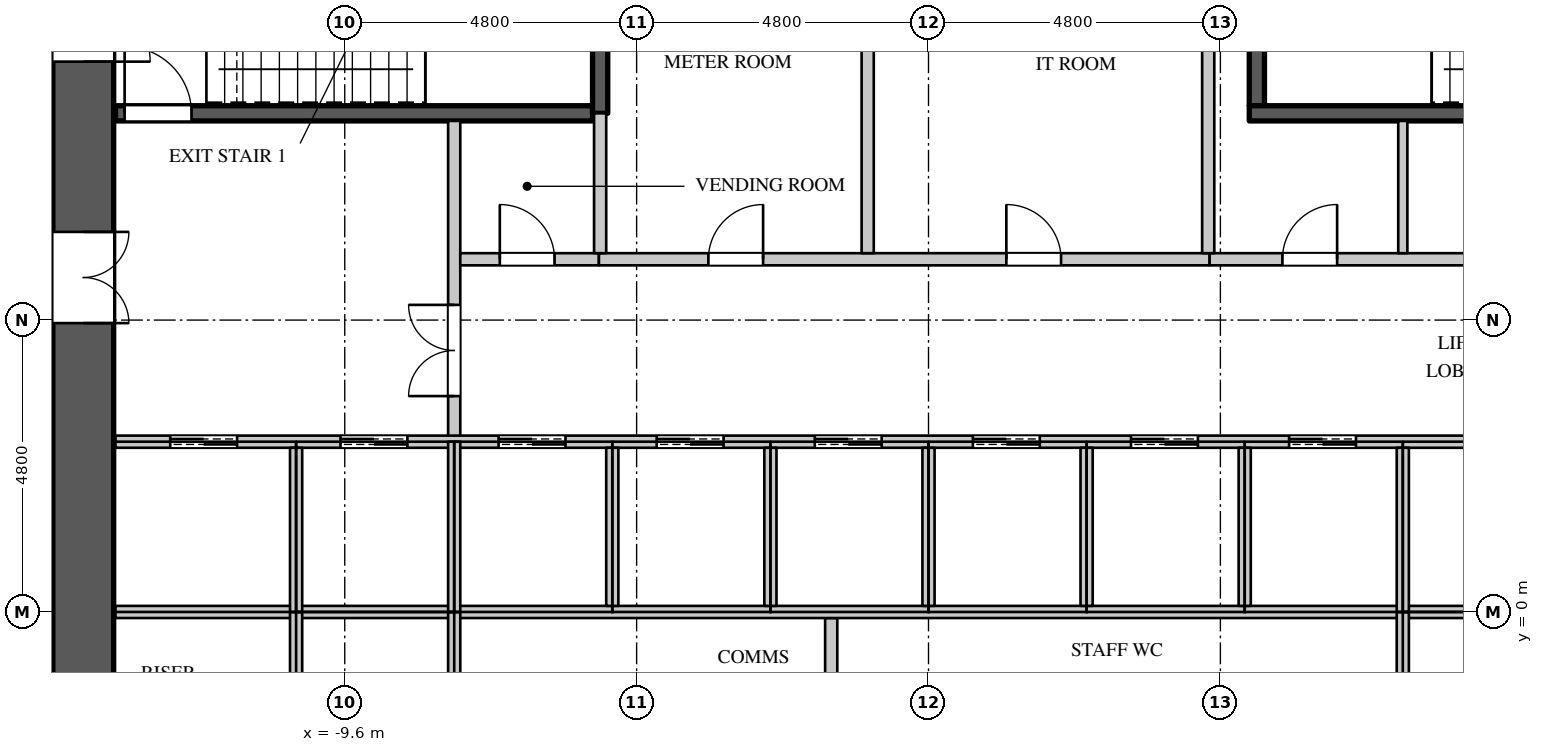
"""IFC4 building model, lengths in metres.
Left out: names, types, materials, properties, quantities, classifications, styles, units other than length and angle.
Written with IfcOpenShell. Run it as: python <this file> out.ifc"""

import sys

from ifc_helpers import new_model, si_unit, direction, frame, frame_2d, origin, place, context, subcontext, project, spatial, rectangle, extrude, element, fill, save


model = new_model("IFC4")
c1 = context("Model", 3, precision=1e-05, world=origin(), true_north=direction((0.0, 1.0)))
c2 = subcontext(c1, "Body", "Model", "MODEL_VIEW")
j1 = project(units=[si_unit("LENGTHUNIT", "METRE"), si_unit("PLANEANGLEUNIT", "RADIAN")], contexts=[c1])
p1 = place(None, origin())
s1 = spatial("IfcSite", under=j1, at=p1, CompositionType="ELEMENT")
p2 = place(p1, origin())
s2 = spatial("IfcBuilding", under=s1, at=p2, CompositionType="ELEMENT")
p3 = place(p2, frame((0.0, 0.0, 80.1)))
s3 = spatial("IfcBuildingStorey", under=s2, at=p3, CompositionType="ELEMENT", Elevation=80.1)
p4 = place(p3, frame((-13.9, -11.0, 0.0), z_axis=(0.0, 0.0, 1.0), x_axis=(0.0, 1.0, 0.0)))
e1 = element("IfcWall", 1, at=p4, inside=s3, PredefinedType="SHEAR", context=c2, shape_type="SweptSolid", body=[
    extrude(rectangle(XDim=22.0, YDim=1.0, at=frame_2d((11.0, 0.0))), origin(), (0.0, 0.0, 1.0), 4.2),
])
p5 = place(p4, frame((20.05, 0.0, 0.0)))
e2 = element("IfcOpeningElement", 2, at=p5, cuts=e1, PredefinedType="OPENING", context=c2, shape_type="SweptSolid", body=[
    extrude(rectangle(XDim=1.1, YDim=2.2, at=frame_2d((0.55, 1.1))), frame((0.0, 0.51, 0.0), z_axis=(0.0, -1.0, 0.0), x_axis=(1.0, 0.0, 0.0)), (0.0, 0.0, 1.0), 1.02),
])
p6 = place(p4, frame((0.85, 0.0, 0.0)))
e3 = element("IfcOpeningElement", 3, at=p6, cuts=e1, PredefinedType="OPENING", context=c2, shape_type="SweptSolid", body=[
    extrude(rectangle(XDim=1.1, YDim=2.2, at=frame_2d((0.55, 1.1))), frame((0.0, 0.51, 0.0), z_axis=(0.0, -1.0, 0.0), x_axis=(1.0, 0.0, 0.0)), (0.0, 0.0, 1.0), 1.02),
])
p7 = place(p4, frame((15.75, 0.0, 0.0)))
e4 = element("IfcOpeningElement", 4, at=p7, cuts=e1, PredefinedType="OPENING", context=c2, shape_type="SweptSolid", body=[
    extrude(rectangle(XDim=1.5, YDim=2.4, at=frame_2d((0.75, 1.2))), frame((0.0, 0.51, 0.0), z_axis=(0.0, -1.0, 0.0), x_axis=(1.0, 0.0, 0.0)), (0.0, 0.0, 1.0), 1.02),
])
p8 = place(p4, frame((4.75, 0.0, 0.0)))
e5 = element("IfcOpeningElement", 5, at=p8, cuts=e1, PredefinedType="OPENING", context=c2, shape_type="SweptSolid", body=[
    extrude(rectangle(XDim=1.5, YDim=2.4, at=frame_2d((0.75, 1.2))), frame((0.0, 0.51, 0.0), z_axis=(0.0, -1.0, 0.0), x_axis=(1.0, 0.0, 0.0)), (0.0, 0.0, 1.0), 1.02),
])
p9 = place(p3, frame((-7.8, 2.8, 0.0), z_axis=(0.0, 0.0, 1.0), x_axis=(0.0, 1.0, 0.0)))
e6 = element("IfcWall", 6, at=p9, inside=s3, PredefinedType="PARTITIONING", context=c2, shape_type="SweptSolid", body=[
    extrude(rectangle(XDim=5.275, YDim=0.2, at=frame_2d((2.637, 0.0))), origin(), (0.0, 0.0, 1.0), 3.95),
])
p10 = place(p9, frame((0.75, 0.0, 0.0)))
e7 = element("IfcOpeningElement", 7, at=p10, cuts=e6, PredefinedType="OPENING", context=c2, shape_type="SweptSolid", body=[
    extrude(rectangle(XDim=1.5, YDim=2.4, at=frame_2d((0.75, 1.2))), frame((0.0, 0.11, 0.0), z_axis=(0.0, -1.0, 0.0), x_axis=(1.0, 0.0, 0.0)), (0.0, 0.0, 1.0), 0.22),
])
p11 = place(p3, frame((-7.7, 5.8, 0.0), z_axis=(0.0, 0.0, 1.0), x_axis=(1.0, 0.0, 0.0)))
e8 = element("IfcWall", 8, at=p11, inside=s3, PredefinedType="PARTITIONING", context=c2, shape_type="SweptSolid", body=[
    extrude(rectangle(XDim=2.28, YDim=0.2, at=frame_2d((1.14, 0.0))), origin(), (0.0, 0.0, 1.0), 3.95),
])
p12 = place(p11, frame((0.65, 0.0, 0.0)))
e9 = element("IfcOpeningElement", 9, at=p12, cuts=e8, PredefinedType="OPENING", context=c2, shape_type="SweptSolid", body=[
    extrude(rectangle(XDim=0.9, YDim=2.2, at=frame_2d((0.45, 1.1))), frame((0.0, 0.11, 0.0), z_axis=(0.0, -1.0, 0.0), x_axis=(1.0, 0.0, 0.0)), (0.0, 0.0, 1.0), 0.22),
])
p13 = place(p3, frame((4.62, 5.8, 0.0), z_axis=(0.0, 0.0, 1.0), x_axis=(1.0, 0.0, 0.0)))
e10 = element("IfcWall", 10, at=p13, inside=s3, PredefinedType="PARTITIONING", context=c2, shape_type="SweptSolid", body=[
    extrude(rectangle(XDim=8.75, YDim=0.2, at=frame_2d((4.375, 0.0))), origin(), (0.0, 0.0, 1.0), 3.95),
])
p14 = place(p13, frame((1.2, 0.0, 0.0)))
e11 = element("IfcOpeningElement", 11, at=p14, cuts=e10, PredefinedType="OPENING", context=c2, shape_type="SweptSolid", body=[
    extrude(rectangle(XDim=0.9, YDim=2.2, at=frame_2d((0.45, 1.1))), frame((0.0, 0.11, 0.0), z_axis=(0.0, -1.0, 0.0), x_axis=(1.0, 0.0, 0.0)), (0.0, 0.0, 1.0), 0.22),
])
p15 = place(p13, frame((5.45, 0.0, 0.0)))
e12 = element("IfcOpeningElement", 12, at=p15, cuts=e10, PredefinedType="OPENING", context=c2, shape_type="SweptSolid", body=[
    extrude(rectangle(XDim=0.9, YDim=2.2, at=frame_2d((0.45, 1.1))), frame((0.0, 0.11, 0.0), z_axis=(0.0, -1.0, 0.0), x_axis=(1.0, 0.0, 0.0)), (0.0, 0.0, 1.0), 0.22),
])
p16 = place(p3, frame((7.8, 5.9, 0.0), z_axis=(0.0, 0.0, 1.0), x_axis=(0.0, 1.0, 0.0)))
e13 = element("IfcWall", 13, at=p16, inside=s3, PredefinedType="PARTITIONING", context=c2, shape_type="SweptSolid", body=[
    extrude(rectangle(XDim=2.175, YDim=0.15, at=frame_2d((1.087, 0.0))), origin(), (0.0, 0.0, 1.0), 3.95),
])
p17 = place(p3, frame((-5.42, 5.8, 0.0), z_axis=(0.0, 0.0, 1.0), x_axis=(1.0, 0.0, 0.0)))
e14 = element("IfcWall", 14, at=p17, inside=s3, PredefinedType="PARTITIONING", context=c2, shape_type="SweptSolid", body=[
    extrude(rectangle(XDim=10.04, YDim=0.2, at=frame_2d((5.02, 0.0))), origin(), (0.0, 0.0, 1.0), 3.95),
])
p18 = place(p17, frame((1.8, 0.0, 0.0)))
e15 = element("IfcOpeningElement", 15, at=p18, cuts=e14, PredefinedType="OPENING", context=c2, shape_type="SweptSolid", body=[
    extrude(rectangle(XDim=0.9, YDim=2.2, at=frame_2d((0.45, 1.1))), frame((0.0, 0.11, 0.0), z_axis=(0.0, -1.0, 0.0), x_axis=(1.0, 0.0, 0.0)), (0.0, 0.0, 1.0), 0.22),
])
p19 = place(p17, frame((6.7, 0.0, 0.0)))
e16 = element("IfcOpeningElement", 16, at=p19, cuts=e14, PredefinedType="OPENING", context=c2, shape_type="SweptSolid", body=[
    extrude(rectangle(XDim=0.9, YDim=2.2, at=frame_2d((0.45, 1.1))), frame((0.0, 0.11, 0.0), z_axis=(0.0, -1.0, 0.0), x_axis=(1.0, 0.0, 0.0)), (0.0, 0.0, 1.0), 0.22),
])
p20 = place(p3, frame((-5.4, 5.9, 0.0), z_axis=(0.0, 0.0, 1.0), x_axis=(0.0, 1.0, 0.0)))
e17 = element("IfcWall", 17, at=p20, inside=s3, PredefinedType="PARTITIONING", context=c2, shape_type="SweptSolid", body=[
    extrude(rectangle(XDim=2.3, YDim=0.2, at=frame_2d((1.15, 0.0))), origin(), (0.0, 0.0, 1.0), 3.95),
])
p21 = place(p3, frame((-1.6, -2.7, 0.0), z_axis=(0.0, 0.0, 1.0), x_axis=(0.0, 1.0, 0.0)))
e18 = element("IfcWall", 18, at=p21, inside=s3, PredefinedType="PARTITIONING", context=c2, shape_type="SweptSolid", body=[
    extrude(rectangle(XDim=2.6, YDim=0.2, at=frame_2d((1.3, 0.0))), origin(), (0.0, 0.0, 1.0), 3.95),
])
for number, where, z_axis, x_axis in (
    (19, (-1.0, 5.9, 0.0), (0.0, 0.0, 1.0), (0.0, 1.0, 0.0)),
    (20, (4.6, 5.9, 0.0), (0.0, 0.0, 1.0), (0.0, 1.0, 0.0)),
):
    element("IfcWall", number, at=place(p3, frame(where, z_axis=z_axis, x_axis=x_axis)), inside=s3, PredefinedType="PARTITIONING", context=c2, shape_type="SweptSolid", body=[
        extrude(rectangle(XDim=5.07, YDim=0.2, at=frame_2d((2.535, 0.0))), origin(), (0.0, 0.0, 1.0), 3.95),
    ])
p22 = place(p3, frame((-13.37, 0.0, 0.0), z_axis=(0.0, 0.0, 1.0), x_axis=(1.0, 0.0, 0.0)))
e21 = element("IfcWall", 21, at=p22, inside=s3, PredefinedType="PARTITIONING", context=c2, shape_type="SweptSolid", body=[
    extrude(rectangle(XDim=23.77, YDim=0.2, at=frame_2d((11.885, 0.0))), origin(), (0.0, 0.0, 1.0), 3.95),
])
p23 = place(p3, frame((-13.37, 2.8, 0.0), z_axis=(0.0, 0.0, 1.0), x_axis=(1.0, 0.0, 0.0)))
e22 = element("IfcWall", 22, at=p23, inside=s3, PredefinedType="PARTITIONING", context=c2, shape_type="SweptSolid", body=[
    extrude(rectangle(XDim=23.77, YDim=0.2, at=frame_2d((11.885, 0.0))), origin(), (0.0, 0.0, 1.0), 3.95),
])
p24 = place(p23, frame((0.9, 0.0, 0.0)))
e23 = element("IfcOpeningElement", 23, at=p24, cuts=e22, PredefinedType="OPENING", context=c2, shape_type="SweptSolid", body=[
    extrude(rectangle(XDim=1.1, YDim=2.2, at=frame_2d((0.55, 1.1))), frame((0.0, 0.11, 0.0), z_axis=(0.0, -1.0, 0.0), x_axis=(1.0, 0.0, 0.0)), (0.0, 0.0, 1.0), 0.22),
])
p25 = place(p23, frame((3.7, 0.0, 0.0)))
e24 = element("IfcOpeningElement", 24, at=p25, cuts=e22, PredefinedType="OPENING", context=c2, shape_type="SweptSolid", body=[
    extrude(rectangle(XDim=1.1, YDim=2.2, at=frame_2d((0.55, 1.1))), frame((0.0, 0.11, 0.0), z_axis=(0.0, -1.0, 0.0), x_axis=(1.0, 0.0, 0.0)), (0.0, 0.0, 1.0), 0.22),
])
p26 = place(p23, frame((6.3, 0.0, 0.0)))
e25 = element("IfcOpeningElement", 25, at=p26, cuts=e22, PredefinedType="OPENING", context=c2, shape_type="SweptSolid", body=[
    extrude(rectangle(XDim=1.1, YDim=2.2, at=frame_2d((0.55, 1.1))), frame((0.0, 0.11, 0.0), z_axis=(0.0, -1.0, 0.0), x_axis=(1.0, 0.0, 0.0)), (0.0, 0.0, 1.0), 0.22),
])
p27 = place(p23, frame((8.9, 0.0, 0.0)))
e26 = element("IfcOpeningElement", 26, at=p27, cuts=e22, PredefinedType="OPENING", context=c2, shape_type="SweptSolid", body=[
    extrude(rectangle(XDim=1.1, YDim=2.2, at=frame_2d((0.55, 1.1))), frame((0.0, 0.11, 0.0), z_axis=(0.0, -1.0, 0.0), x_axis=(1.0, 0.0, 0.0)), (0.0, 0.0, 1.0), 0.22),
])
p28 = place(p23, frame((11.5, 0.0, 0.0)))
e27 = element("IfcOpeningElement", 27, at=p28, cuts=e22, PredefinedType="OPENING", context=c2, shape_type="SweptSolid", body=[
    extrude(rectangle(XDim=1.1, YDim=2.2, at=frame_2d((0.55, 1.1))), frame((0.0, 0.11, 0.0), z_axis=(0.0, -1.0, 0.0), x_axis=(1.0, 0.0, 0.0)), (0.0, 0.0, 1.0), 0.22),
])
p29 = place(p23, frame((14.1, 0.0, 0.0)))
e28 = element("IfcOpeningElement", 28, at=p29, cuts=e22, PredefinedType="OPENING", context=c2, shape_type="SweptSolid", body=[
    extrude(rectangle(XDim=1.1, YDim=2.2, at=frame_2d((0.55, 1.1))), frame((0.0, 0.11, 0.0), z_axis=(0.0, -1.0, 0.0), x_axis=(1.0, 0.0, 0.0)), (0.0, 0.0, 1.0), 0.22),
])
p30 = place(p23, frame((16.7, 0.0, 0.0)))
e29 = element("IfcOpeningElement", 29, at=p30, cuts=e22, PredefinedType="OPENING", context=c2, shape_type="SweptSolid", body=[
    extrude(rectangle(XDim=1.1, YDim=2.2, at=frame_2d((0.55, 1.1))), frame((0.0, 0.11, 0.0), z_axis=(0.0, -1.0, 0.0), x_axis=(1.0, 0.0, 0.0)), (0.0, 0.0, 1.0), 0.22),
])
p31 = place(p23, frame((19.3, 0.0, 0.0)))
e30 = element("IfcOpeningElement", 30, at=p31, cuts=e22, PredefinedType="OPENING", context=c2, shape_type="SweptSolid", body=[
    extrude(rectangle(XDim=1.1, YDim=2.2, at=frame_2d((0.55, 1.1))), frame((0.0, 0.11, 0.0), z_axis=(0.0, -1.0, 0.0), x_axis=(1.0, 0.0, 0.0)), (0.0, 0.0, 1.0), 0.22),
])
for number, where, z_axis, x_axis in (
    (31, (-10.4, -2.7, 0.0), (0.0, 0.0, 1.0), (0.0, 1.0, 0.0)),
    (32, (-10.4, 0.0, 0.0), (0.0, 0.0, 1.0), (0.0, 1.0, 0.0)),
):
    element("IfcWall", number, at=place(p3, frame(where, z_axis=z_axis, x_axis=x_axis)), inside=s3, PredefinedType="PARTITIONING", context=c2, shape_type="SweptSolid", body=[
        extrude(rectangle(XDim=2.7, YDim=0.2, at=frame_2d((1.35, 0.0))), origin(), (0.0, 0.0, 1.0), 3.95),
    ])
for number, where, z_axis, x_axis in (
    (33, (-7.8, -2.8, 0.0), (0.0, 0.0, 1.0), (0.0, 1.0, 0.0)),
    (34, (-7.8, 0.0, 0.0), (0.0, 0.0, 1.0), (0.0, 1.0, 0.0)),
):
    element("IfcWall", number, at=place(p3, frame(where, z_axis=z_axis, x_axis=x_axis)), inside=s3, PredefinedType="PARTITIONING", context=c2, shape_type="SweptSolid", body=[
        extrude(rectangle(XDim=2.8, YDim=0.2, at=frame_2d((1.4, 0.0))), origin(), (0.0, 0.0, 1.0), 3.95),
    ])
for number, where, z_axis, x_axis in (
    (35, (-5.2, 0.1, 0.0), (0.0, 0.0, 1.0), (0.0, 1.0, 0.0)),
    (36, (-2.6, 0.1, 0.0), (0.0, 0.0, 1.0), (0.0, 1.0, 0.0)),
    (37, (0.0, 0.1, 0.0), (0.0, 0.0, 1.0), (0.0, 1.0, 0.0)),
    (38, (2.6, 0.1, 0.0), (0.0, 0.0, 1.0), (0.0, 1.0, 0.0)),
    (39, (5.2, 0.1, 0.0), (0.0, 0.0, 1.0), (0.0, 1.0, 0.0)),
):
    element("IfcWall", number, at=place(p3, frame(where, z_axis=z_axis, x_axis=x_axis)), inside=s3, PredefinedType="PARTITIONING", context=c2, shape_type="SweptSolid", body=[
        extrude(rectangle(XDim=2.6, YDim=0.2, at=frame_2d((1.3, 0.0))), origin(), (0.0, 0.0, 1.0), 3.95),
    ])
for number, where, z_axis, x_axis in (
    (40, (7.8, -2.7, 0.0), (0.0, 0.0, 1.0), (0.0, 1.0, 0.0)),
    (41, (7.8, 0.0, 0.0), (0.0, 0.0, 1.0), (0.0, 1.0, 0.0)),
):
    element("IfcWall", number, at=place(p3, frame(where, z_axis=z_axis, x_axis=x_axis)), inside=s3, PredefinedType="PARTITIONING", context=c2, shape_type="SweptSolid", body=[
        extrude(rectangle(XDim=2.7, YDim=0.2, at=frame_2d((1.35, 0.0))), origin(), (0.0, 0.0, 1.0), 3.95),
    ])
p32 = place(p3, frame((-13.37, 8.2, 0.0), z_axis=(0.0, 0.0, 1.0), x_axis=(1.0, 0.0, 0.0)))
e42 = element("IfcWall", 42, at=p32, inside=s3, PredefinedType="SHEAR", context=c2, shape_type="SweptSolid", body=[
    extrude(rectangle(XDim=7.845, YDim=0.25, at=frame_2d((3.923, 0.0))), origin(), (0.0, 0.0, 1.0), 3.95),
])
p33 = place(p32, frame((0.15, 0.0, 0.0)))
e43 = element("IfcOpeningElement", 43, at=p33, cuts=e42, PredefinedType="OPENING", context=c2, shape_type="SweptSolid", body=[
    extrude(rectangle(XDim=1.1, YDim=2.2, at=frame_2d((0.55, 1.1))), frame((0.0, 0.135, 0.0), z_axis=(0.0, -1.0, 0.0), x_axis=(1.0, 0.0, 0.0)), (0.0, 0.0, 1.0), 0.27),
])
p34 = place(p3, frame((-5.4, 8.2, 0.0), z_axis=(0.0, 0.0, 1.0), x_axis=(0.0, 1.0, 0.0)))
e44 = element("IfcWall", 44, at=p34, inside=s3, PredefinedType="SHEAR", context=c2, shape_type="SweptSolid", body=[
    extrude(rectangle(XDim=2.77, YDim=0.25, at=frame_2d((1.385, 0.0))), origin(), (0.0, 0.0, 1.0), 3.95),
])
p35 = place(p3, frame((5.4, 8.325, 0.0), z_axis=(0.0, 0.0, 1.0), x_axis=(0.0, 1.0, 0.0)))
e45 = element("IfcWall", 45, at=p35, inside=s3, PredefinedType="SHEAR", context=c2, shape_type="SweptSolid", body=[
    extrude(rectangle(XDim=2.645, YDim=0.25, at=frame_2d((1.323, 0.0))), origin(), (0.0, 0.0, 1.0), 3.95),
])
p36 = place(p3, frame((5.275, 8.2, 0.0), z_axis=(0.0, 0.0, 1.0), x_axis=(1.0, 0.0, 0.0)))
e46 = element("IfcWall", 46, at=p36, inside=s3, PredefinedType="SHEAR", context=c2, shape_type="SweptSolid", body=[
    extrude(rectangle(XDim=8.095, YDim=0.25, at=frame_2d((4.048, 0.0))), origin(), (0.0, 0.0, 1.0), 3.95),
])
p37 = place(p12, origin())
e47 = element("IfcDoor", 47, at=p37, inside=s3, OperationType="SINGLE_SWING_LEFT", PredefinedType="DOOR", context=c2, shape_type="SweptSolid", body=[
    extrude(rectangle(XDim=0.9, YDim=2.2, at=frame_2d((0.45, 1.1))), frame((0.0, 0.025, 0.0), z_axis=(0.0, -1.0, 0.0), x_axis=(1.0, 0.0, 0.0)), (0.0, 0.0, 1.0), 0.05),
])
fill(e9, e47)
p38 = place(p18, origin())
e48 = element("IfcDoor", 48, at=p38, inside=s3, OperationType="SINGLE_SWING_RIGHT", PredefinedType="DOOR", context=c2, shape_type="SweptSolid", body=[
    extrude(rectangle(XDim=0.9, YDim=2.2, at=frame_2d((0.45, 1.1))), frame((0.0, 0.025, 0.0), z_axis=(0.0, -1.0, 0.0), x_axis=(1.0, 0.0, 0.0)), (0.0, 0.0, 1.0), 0.05),
])
fill(e15, e48)
p39 = place(p19, origin())
e49 = element("IfcDoor", 49, at=p39, inside=s3, OperationType="SINGLE_SWING_LEFT", PredefinedType="DOOR", context=c2, shape_type="SweptSolid", body=[
    extrude(rectangle(XDim=0.9, YDim=2.2, at=frame_2d((0.45, 1.1))), frame((0.0, 0.025, 0.0), z_axis=(0.0, -1.0, 0.0), x_axis=(1.0, 0.0, 0.0)), (0.0, 0.0, 1.0), 0.05),
])
fill(e16, e49)
p40 = place(p14, origin())
e50 = element("IfcDoor", 50, at=p40, inside=s3, OperationType="SINGLE_SWING_RIGHT", PredefinedType="DOOR", context=c2, shape_type="SweptSolid", body=[
    extrude(rectangle(XDim=0.9, YDim=2.2, at=frame_2d((0.45, 1.1))), frame((0.0, 0.025, 0.0), z_axis=(0.0, -1.0, 0.0), x_axis=(1.0, 0.0, 0.0)), (0.0, 0.0, 1.0), 0.05),
])
fill(e11, e50)
p41 = place(p24, origin())
e51 = element("IfcDoor", 51, at=p41, inside=s3, OperationType="DOUBLE_DOOR_SLIDING", PredefinedType="DOOR", context=c2, shape_type="SweptSolid", body=[
    extrude(rectangle(XDim=1.1, YDim=2.2, at=frame_2d((0.55, 1.1))), frame((0.0, 0.025, 0.0), z_axis=(0.0, -1.0, 0.0), x_axis=(1.0, 0.0, 0.0)), (0.0, 0.0, 1.0), 0.05),
])
fill(e23, e51)
p42 = place(p25, origin())
e52 = element("IfcDoor", 52, at=p42, inside=s3, OperationType="DOUBLE_DOOR_SLIDING", PredefinedType="DOOR", context=c2, shape_type="SweptSolid", body=[
    extrude(rectangle(XDim=1.1, YDim=2.2, at=frame_2d((0.55, 1.1))), frame((0.0, 0.025, 0.0), z_axis=(0.0, -1.0, 0.0), x_axis=(1.0, 0.0, 0.0)), (0.0, 0.0, 1.0), 0.05),
])
fill(e24, e52)
p43 = place(p26, origin())
e53 = element("IfcDoor", 53, at=p43, inside=s3, OperationType="DOUBLE_DOOR_SLIDING", PredefinedType="DOOR", context=c2, shape_type="SweptSolid", body=[
    extrude(rectangle(XDim=1.1, YDim=2.2, at=frame_2d((0.55, 1.1))), frame((0.0, 0.025, 0.0), z_axis=(0.0, -1.0, 0.0), x_axis=(1.0, 0.0, 0.0)), (0.0, 0.0, 1.0), 0.05),
])
fill(e25, e53)
p44 = place(p27, origin())
e54 = element("IfcDoor", 54, at=p44, inside=s3, OperationType="DOUBLE_DOOR_SLIDING", PredefinedType="DOOR", context=c2, shape_type="SweptSolid", body=[
    extrude(rectangle(XDim=1.1, YDim=2.2, at=frame_2d((0.55, 1.1))), frame((0.0, 0.025, 0.0), z_axis=(0.0, -1.0, 0.0), x_axis=(1.0, 0.0, 0.0)), (0.0, 0.0, 1.0), 0.05),
])
fill(e26, e54)
p45 = place(p28, origin())
e55 = element("IfcDoor", 55, at=p45, inside=s3, OperationType="DOUBLE_DOOR_SLIDING", PredefinedType="DOOR", context=c2, shape_type="SweptSolid", body=[
    extrude(rectangle(XDim=1.1, YDim=2.2, at=frame_2d((0.55, 1.1))), frame((0.0, 0.025, 0.0), z_axis=(0.0, -1.0, 0.0), x_axis=(1.0, 0.0, 0.0)), (0.0, 0.0, 1.0), 0.05),
])
fill(e27, e55)
p46 = place(p29, origin())
e56 = element("IfcDoor", 56, at=p46, inside=s3, OperationType="DOUBLE_DOOR_SLIDING", PredefinedType="DOOR", context=c2, shape_type="SweptSolid", body=[
    extrude(rectangle(XDim=1.1, YDim=2.2, at=frame_2d((0.55, 1.1))), frame((0.0, 0.025, 0.0), z_axis=(0.0, -1.0, 0.0), x_axis=(1.0, 0.0, 0.0)), (0.0, 0.0, 1.0), 0.05),
])
fill(e28, e56)
p47 = place(p30, origin())
e57 = element("IfcDoor", 57, at=p47, inside=s3, OperationType="DOUBLE_DOOR_SLIDING", PredefinedType="DOOR", context=c2, shape_type="SweptSolid", body=[
    extrude(rectangle(XDim=1.1, YDim=2.2, at=frame_2d((0.55, 1.1))), frame((0.0, 0.025, 0.0), z_axis=(0.0, -1.0, 0.0), x_axis=(1.0, 0.0, 0.0)), (0.0, 0.0, 1.0), 0.05),
])
fill(e29, e57)
p48 = place(p31, origin())
e58 = element("IfcDoor", 58, at=p48, inside=s3, OperationType="DOUBLE_DOOR_SLIDING", PredefinedType="DOOR", context=c2, shape_type="SweptSolid", body=[
    extrude(rectangle(XDim=1.1, YDim=2.2, at=frame_2d((0.55, 1.1))), frame((0.0, 0.025, 0.0), z_axis=(0.0, -1.0, 0.0), x_axis=(1.0, 0.0, 0.0)), (0.0, 0.0, 1.0), 0.05),
])
fill(e30, e58)
p49 = place(p33, origin())
e59 = element("IfcDoor", 59, at=p49, inside=s3, OperationType="SINGLE_SWING_LEFT", PredefinedType="DOOR", context=c2, shape_type="SweptSolid", body=[
    extrude(rectangle(XDim=1.1, YDim=2.2, at=frame_2d((0.55, 1.1))), frame((0.0, 0.025, 0.0), z_axis=(0.0, -1.0, 0.0), x_axis=(1.0, 0.0, 0.0)), (0.0, 0.0, 1.0), 0.05),
])
fill(e43, e59)
p50 = place(p10, origin())
e60 = element("IfcDoor", 60, at=p50, inside=s3, OperationType="DOUBLE_DOOR_SINGLE_SWING", PredefinedType="DOOR", context=c2, shape_type="SweptSolid", body=[
    extrude(rectangle(XDim=1.5, YDim=2.4, at=frame_2d((0.75, 1.2))), frame((0.0, 0.025, 0.0), z_axis=(0.0, -1.0, 0.0), x_axis=(1.0, 0.0, 0.0)), (0.0, 0.0, 1.0), 0.05),
])
fill(e7, e60)
p51 = place(p5, origin())
e61 = element("IfcDoor", 61, at=p51, inside=s3, OperationType="SINGLE_SWING_RIGHT", PredefinedType="DOOR", context=c2, shape_type="SweptSolid", body=[
    extrude(rectangle(XDim=1.1, YDim=2.2, at=frame_2d((0.55, 1.1))), frame((0.0, -0.445, 0.0), z_axis=(0.0, -1.0, 0.0), x_axis=(1.0, 0.0, 0.0)), (0.0, 0.0, 1.0), 0.05),
])
fill(e2, e61)
p52 = place(p7, origin())
e62 = element("IfcDoor", 62, at=p52, inside=s3, OperationType="DOUBLE_DOOR_SINGLE_SWING", PredefinedType="DOOR", context=c2, shape_type="SweptSolid", body=[
    extrude(rectangle(XDim=1.5, YDim=2.4, at=frame_2d((0.75, 1.2))), frame((0.0, -0.445, 0.0), z_axis=(0.0, -1.0, 0.0), x_axis=(1.0, 0.0, 0.0)), (0.0, 0.0, 1.0), 0.05),
])
fill(e4, e62)
save(model, sys.argv[1])
